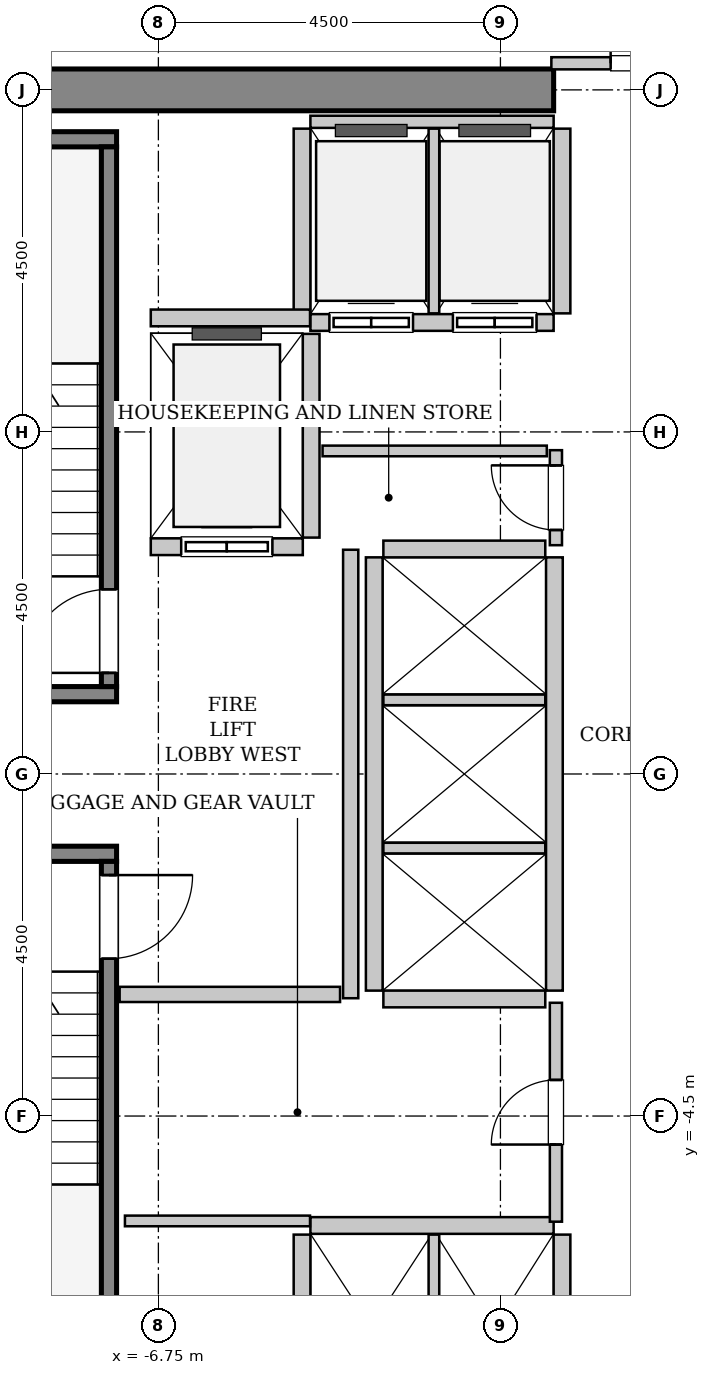
"""IFC4 building model, lengths in metres.
Left out: names, types, materials, properties, quantities, classifications, styles, units other than length and angle.
Written with IfcOpenShell. Run it as: python <this file> out.ifc"""

import sys

from ifc_helpers import new_model, si_unit, direction, frame, frame_2d, origin, place, context, subcontext, project, spatial, rectangle, extrude, source, transform, mapped, element, fill, save


model = new_model("IFC4")
c1 = context("Model", 3, precision=1e-05, world=origin(), true_north=direction((0.0, 1.0)))
c2 = subcontext(c1, "Body", "Model", "MODEL_VIEW")
j1 = project(units=[si_unit("LENGTHUNIT", "METRE"), si_unit("PLANEANGLEUNIT", "RADIAN")], contexts=[c1])
p1 = place(None, origin())
s1 = spatial("IfcSite", under=j1, at=p1, CompositionType="ELEMENT")
p2 = place(p1, origin())
s2 = spatial("IfcBuilding", under=s1, at=p2, CompositionType="ELEMENT")
p3 = place(p2, frame((0.0, 0.0, 113.6)))
s3 = spatial("IfcBuildingStorey", under=s2, at=p3, CompositionType="ELEMENT", Elevation=113.6)
m1 = source(origin(), c2, "Body", "SweptSolid", [
    extrude(rectangle(XDim=9.975, YDim=0.55, at=frame_2d((4.987, 0.0))), origin(), (0.0, 0.0, 1.0), 3.8),
])
p4 = place(p3, frame((-11.525, 9.0, 0.0), z_axis=(0.0, 0.0, 1.0), x_axis=(1.0, 0.0, 0.0)))
e1 = element("IfcWall", 1, at=p4, inside=s3, PredefinedType="SHEAR", context=c2, shape_type="MappedRepresentation", body=[
    mapped(m1, transform((0.0, 0.0, 0.0), x_axis=(1.0, 0.0, 0.0), y_axis=(0.0, 1.0, 0.0), z_axis=(0.0, 0.0, 1.0), scale=1.0)),
])
m2 = source(origin(), c2, "Body", "SweptSolid", [
    extrude(rectangle(XDim=3.4, YDim=0.2, at=frame_2d((1.7, 0.0))), origin(), (0.0, 0.0, 1.0), 3.8),
])
p5 = place(p3, frame((-7.3, 1.05, 0.0), z_axis=(0.0, 0.0, 1.0), x_axis=(-1.0, 0.0, 0.0)))
e2 = element("IfcWall", 2, at=p5, inside=s3, PredefinedType="SOLIDWALL", context=c2, shape_type="MappedRepresentation", body=[
    mapped(m2, transform((0.0, 0.0, 0.0), x_axis=(1.0, 0.0, 0.0), y_axis=(0.0, 1.0, 0.0), z_axis=(0.0, 0.0, 1.0), scale=1.0)),
])
m3 = source(origin(), c2, "Body", "SweptSolid", [
    extrude(rectangle(XDim=3.68, YDim=0.2, at=frame_2d((1.84, 0.0))), origin(), (0.0, 0.0, 1.0), 3.8),
])
p6 = place(p3, frame((-7.3, 8.35, 0.0), z_axis=(0.0, 0.0, 1.0), x_axis=(-1.0, 0.0, 0.0)))
e3 = element("IfcWall", 3, at=p6, inside=s3, PredefinedType="SOLIDWALL", context=c2, shape_type="MappedRepresentation", body=[
    mapped(m3, transform((0.0, 0.0, 0.0), x_axis=(1.0, 0.0, 0.0), y_axis=(0.0, 1.0, 0.0), z_axis=(0.0, 0.0, 1.0), scale=1.0)),
])
m4 = source(origin(), c2, "Body", "SweptSolid", [
    extrude(rectangle(XDim=7.1, YDim=0.2, at=frame_2d((3.55, 0.0))), origin(), (0.0, 0.0, 1.0), 3.8),
])
p7 = place(p3, frame((-7.4, 1.15, 0.0), z_axis=(0.0, 0.0, 1.0), x_axis=(0.0, 1.0, 0.0)))
e4 = element("IfcWall", 4, at=p7, inside=s3, PredefinedType="SOLIDWALL", context=c2, shape_type="MappedRepresentation", body=[
    mapped(m4, transform((0.0, 0.0, 0.0), x_axis=(1.0, 0.0, 0.0), y_axis=(0.0, 1.0, 0.0), z_axis=(0.0, 0.0, 1.0), scale=1.0)),
])
p8 = place(p7, frame((0.18, 0.0, 0.0)))
e5 = element("IfcOpeningElement", 5, at=p8, cuts=e4, PredefinedType="OPENING", context=c2, shape_type="SweptSolid", body=[
    extrude(rectangle(XDim=1.1, YDim=2.15, at=frame_2d((0.55, 1.075))), frame((0.0, 0.11, 0.0), z_axis=(0.0, -1.0, 0.0), x_axis=(1.0, 0.0, 0.0)), (0.0, 0.0, 1.0), 0.22),
])
p9 = place(p3, frame((-10.7, -1.05, 0.0), z_axis=(0.0, 0.0, 1.0), x_axis=(1.0, 0.0, 0.0)))
e6 = element("IfcWall", 6, at=p9, inside=s3, PredefinedType="SOLIDWALL", context=c2, shape_type="MappedRepresentation", body=[
    mapped(m2, transform((0.0, 0.0, 0.0), x_axis=(1.0, 0.0, 0.0), y_axis=(0.0, 1.0, 0.0), z_axis=(0.0, 0.0, 1.0), scale=1.0)),
])
p10 = place(p3, frame((-7.4, -1.15, 0.0), z_axis=(0.0, 0.0, 1.0), x_axis=(0.0, -1.0, 0.0)))
e7 = element("IfcWall", 7, at=p10, inside=s3, PredefinedType="SOLIDWALL", context=c2, shape_type="MappedRepresentation", body=[
    mapped(m4, transform((0.0, 0.0, 0.0), x_axis=(1.0, 0.0, 0.0), y_axis=(0.0, 1.0, 0.0), z_axis=(0.0, 0.0, 1.0), scale=1.0)),
])
p11 = place(p10, frame((0.18, 0.0, 0.0)))
e8 = element("IfcOpeningElement", 8, at=p11, cuts=e7, PredefinedType="OPENING", context=c2, shape_type="SweptSolid", body=[
    extrude(rectangle(XDim=1.1, YDim=2.15, at=frame_2d((0.55, 1.075))), frame((0.0, 0.11, 0.0), z_axis=(0.0, -1.0, 0.0), x_axis=(1.0, 0.0, 0.0)), (0.0, 0.0, 1.0), 0.22),
])
m5 = source(origin(), c2, "Body", "SweptSolid", [
    extrude(rectangle(XDim=2.0, YDim=0.22, at=frame_2d((1.0, 0.0))), origin(), (0.0, 0.0, 1.0), 3.535),
])
p12 = place(p3, frame((-6.85, 2.99, 0.0), z_axis=(0.0, 0.0, 1.0), x_axis=(1.0, 0.0, 0.0)))
e9 = element("IfcWall", 9, at=p12, inside=s3, PredefinedType="SOLIDWALL", context=c2, shape_type="MappedRepresentation", body=[
    mapped(m5, transform((0.0, 0.0, 0.0), x_axis=(1.0, 0.0, 0.0), y_axis=(0.0, 1.0, 0.0), z_axis=(0.0, 0.0, 1.0), scale=1.0)),
])
p13 = place(p12, frame((0.4, 0.0, 0.0)))
e10 = element("IfcOpeningElement", 10, at=p13, cuts=e9, PredefinedType="OPENING", context=c2, shape_type="SweptSolid", body=[
    extrude(rectangle(XDim=1.2, YDim=2.2, at=frame_2d((0.6, 1.1))), frame((0.0, 0.12, 0.0), z_axis=(0.0, -1.0, 0.0), x_axis=(1.0, 0.0, 0.0)), (0.0, 0.0, 1.0), 0.24),
])
m6 = source(origin(), c2, "Body", "SweptSolid", [
    extrude(rectangle(XDim=2.68, YDim=0.22, at=frame_2d((1.34, 0.0))), origin(), (0.0, 0.0, 1.0), 3.535),
])
p14 = place(p3, frame((-4.74, 3.11, 0.0), z_axis=(0.0, 0.0, 1.0), x_axis=(0.0, 1.0, 0.0)))
e11 = element("IfcWall", 11, at=p14, inside=s3, PredefinedType="SOLIDWALL", context=c2, shape_type="MappedRepresentation", body=[
    mapped(m6, transform((0.0, 0.0, 0.0), x_axis=(1.0, 0.0, 0.0), y_axis=(0.0, 1.0, 0.0), z_axis=(0.0, 0.0, 1.0), scale=1.0)),
])
m7 = source(origin(), c2, "Body", "SweptSolid", [
    extrude(rectangle(XDim=3.2, YDim=0.22, at=frame_2d((1.6, 0.0))), origin(), (0.0, 0.0, 1.0), 3.535),
])
p15 = place(p3, frame((-4.75, 5.94, 0.0), z_axis=(0.0, 0.0, 1.0), x_axis=(1.0, 0.0, 0.0)))
e12 = element("IfcWall", 12, at=p15, inside=s3, PredefinedType="SOLIDWALL", context=c2, shape_type="MappedRepresentation", body=[
    mapped(m7, transform((0.0, 0.0, 0.0), x_axis=(1.0, 0.0, 0.0), y_axis=(0.0, 1.0, 0.0), z_axis=(0.0, 0.0, 1.0), scale=1.0)),
])
p16 = place(p15, frame((0.25, 0.0, 0.0)))
e13 = element("IfcOpeningElement", 13, at=p16, cuts=e12, PredefinedType="OPENING", context=c2, shape_type="SweptSolid", body=[
    extrude(rectangle(XDim=1.1, YDim=2.2, at=frame_2d((0.55, 1.1))), frame((0.0, 0.12, 0.0), z_axis=(0.0, -1.0, 0.0), x_axis=(1.0, 0.0, 0.0)), (0.0, 0.0, 1.0), 0.24),
])
p17 = place(p15, frame((1.875, 0.0, 0.0)))
e14 = element("IfcOpeningElement", 14, at=p17, cuts=e12, PredefinedType="OPENING", context=c2, shape_type="SweptSolid", body=[
    extrude(rectangle(XDim=1.1, YDim=2.2, at=frame_2d((0.55, 1.1))), frame((0.0, 0.12, 0.0), z_axis=(0.0, -1.0, 0.0), x_axis=(1.0, 0.0, 0.0)), (0.0, 0.0, 1.0), 0.24),
])
m8 = source(origin(), c2, "Body", "SweptSolid", [
    extrude(rectangle(XDim=3.2, YDim=0.16, at=frame_2d((1.6, 0.0))), origin(), (0.0, 0.0, 1.0), 2.425),
])
p18 = place(p3, frame((-1.55, 8.58, 0.0), z_axis=(0.0, 0.0, 1.0), x_axis=(-1.0, 0.0, 0.0)))
e15 = element("IfcWall", 15, at=p18, inside=s3, PredefinedType="PARTITIONING", context=c2, shape_type="MappedRepresentation", body=[
    mapped(m8, transform((0.0, 0.0, 0.0), x_axis=(1.0, 0.0, 0.0), y_axis=(0.0, 1.0, 0.0), z_axis=(0.0, 0.0, 1.0), scale=1.0)),
])
m9 = source(origin(), c2, "Body", "SweptSolid", [
    extrude(rectangle(XDim=2.43, YDim=0.22, at=frame_2d((1.215, 0.0))), origin(), (0.0, 0.0, 1.0), 3.535),
])
p19 = place(p3, frame((-4.86, 8.49, 0.0), z_axis=(0.0, 0.0, 1.0), x_axis=(0.0, -1.0, 0.0)))
e16 = element("IfcWall", 16, at=p19, inside=s3, PredefinedType="SOLIDWALL", context=c2, shape_type="MappedRepresentation", body=[
    mapped(m9, transform((0.0, 0.0, 0.0), x_axis=(1.0, 0.0, 0.0), y_axis=(0.0, 1.0, 0.0), z_axis=(0.0, 0.0, 1.0), scale=1.0)),
])
m10 = source(origin(), c2, "Body", "SweptSolid", [
    extrude(rectangle(XDim=2.43, YDim=0.14, at=frame_2d((1.215, 0.0))), origin(), (0.0, 0.0, 1.0), 3.535),
])
p20 = place(p3, frame((-3.125, 6.06, 0.0), z_axis=(0.0, 0.0, 1.0), x_axis=(0.0, 1.0, 0.0)))
e17 = element("IfcWall", 17, at=p20, inside=s3, PredefinedType="PARTITIONING", context=c2, shape_type="MappedRepresentation", body=[
    mapped(m10, transform((0.0, 0.0, 0.0), x_axis=(1.0, 0.0, 0.0), y_axis=(0.0, 1.0, 0.0), z_axis=(0.0, 0.0, 1.0), scale=1.0)),
])
p21 = place(p3, frame((-1.44, 6.06, 0.0), z_axis=(0.0, 0.0, 1.0), x_axis=(0.0, 1.0, 0.0)))
e18 = element("IfcWall", 18, at=p21, inside=s3, PredefinedType="SOLIDWALL", context=c2, shape_type="MappedRepresentation", body=[
    mapped(m9, transform((0.0, 0.0, 0.0), x_axis=(1.0, 0.0, 0.0), y_axis=(0.0, 1.0, 0.0), z_axis=(0.0, 0.0, 1.0), scale=1.0)),
])
p22 = place(p3, frame((-1.55, -5.94, 0.0), z_axis=(0.0, 0.0, 1.0), x_axis=(-1.0, 0.0, 0.0)))
e19 = element("IfcWall", 19, at=p22, inside=s3, PredefinedType="SOLIDWALL", context=c2, shape_type="MappedRepresentation", body=[
    mapped(m7, transform((0.0, 0.0, 0.0), x_axis=(1.0, 0.0, 0.0), y_axis=(0.0, 1.0, 0.0), z_axis=(0.0, 0.0, 1.0), scale=1.0)),
])
p23 = place(p3, frame((-4.86, -6.06, 0.0), z_axis=(0.0, 0.0, 1.0), x_axis=(0.0, -1.0, 0.0)))
e20 = element("IfcWall", 20, at=p23, inside=s3, PredefinedType="SOLIDWALL", context=c2, shape_type="MappedRepresentation", body=[
    mapped(m9, transform((0.0, 0.0, 0.0), x_axis=(1.0, 0.0, 0.0), y_axis=(0.0, 1.0, 0.0), z_axis=(0.0, 0.0, 1.0), scale=1.0)),
])
p24 = place(p3, frame((-3.125, -8.49, 0.0), z_axis=(0.0, 0.0, 1.0), x_axis=(0.0, 1.0, 0.0)))
e21 = element("IfcWall", 21, at=p24, inside=s3, PredefinedType="PARTITIONING", context=c2, shape_type="MappedRepresentation", body=[
    mapped(m10, transform((0.0, 0.0, 0.0), x_axis=(1.0, 0.0, 0.0), y_axis=(0.0, 1.0, 0.0), z_axis=(0.0, 0.0, 1.0), scale=1.0)),
])
p25 = place(p3, frame((-1.44, -8.49, 0.0), z_axis=(0.0, 0.0, 1.0), x_axis=(0.0, 1.0, 0.0)))
e22 = element("IfcWall", 22, at=p25, inside=s3, PredefinedType="SOLIDWALL", context=c2, shape_type="MappedRepresentation", body=[
    mapped(m9, transform((0.0, 0.0, 0.0), x_axis=(1.0, 0.0, 0.0), y_axis=(0.0, 1.0, 0.0), z_axis=(0.0, 0.0, 1.0), scale=1.0)),
])
m11 = source(origin(), c2, "Body", "SweptSolid", [
    extrude(rectangle(XDim=5.7, YDim=0.22, at=frame_2d((2.85, 0.0))), origin(), (0.0, 0.0, 1.0), 3.535),
])
for number, where, z_axis, x_axis in (
    (23, (-1.54, -2.85, 0.0), (0.0, 0.0, 1.0), (0.0, 1.0, 0.0)),
    (24, (-3.91, 2.85, 0.0), (0.0, 0.0, 1.0), (0.0, -1.0, 0.0)),
):
    element("IfcWall", number, at=place(p3, frame(where, z_axis=z_axis, x_axis=x_axis)), inside=s3, PredefinedType="SOLIDWALL", context=c2, shape_type="MappedRepresentation", body=[
        mapped(m11, transform((0.0, 0.0, 0.0), x_axis=(1.0, 0.0, 0.0), y_axis=(0.0, 1.0, 0.0), z_axis=(0.0, 0.0, 1.0), scale=1.0)),
    ])
m12 = source(origin(), c2, "Body", "SweptSolid", [
    extrude(rectangle(XDim=2.13, YDim=0.22, at=frame_2d((1.065, 0.0))), origin(), (0.0, 0.0, 1.0), 3.535),
])
p26 = place(p3, frame((-3.79, -2.96, 0.0), z_axis=(0.0, 0.0, 1.0), x_axis=(1.0, 0.0, 0.0)))
e25 = element("IfcWall", 25, at=p26, inside=s3, PredefinedType="SOLIDWALL", context=c2, shape_type="MappedRepresentation", body=[
    mapped(m12, transform((0.0, 0.0, 0.0), x_axis=(1.0, 0.0, 0.0), y_axis=(0.0, 1.0, 0.0), z_axis=(0.0, 0.0, 1.0), scale=1.0)),
])
m13 = source(origin(), c2, "Body", "SweptSolid", [
    extrude(rectangle(XDim=2.13, YDim=0.14, at=frame_2d((1.065, 0.0))), origin(), (0.0, 0.0, 1.0), 3.535),
])
for number, where, z_axis, x_axis in (
    (26, (-3.79, -0.975, 0.0), (0.0, 0.0, 1.0), (1.0, 0.0, 0.0)),
    (27, (-3.79, 0.975, 0.0), (0.0, 0.0, 1.0), (1.0, 0.0, 0.0)),
):
    element("IfcWall", number, at=place(p3, frame(where, z_axis=z_axis, x_axis=x_axis)), inside=s3, PredefinedType="PARTITIONING", context=c2, shape_type="MappedRepresentation", body=[
        mapped(m13, transform((0.0, 0.0, 0.0), x_axis=(1.0, 0.0, 0.0), y_axis=(0.0, 1.0, 0.0), z_axis=(0.0, 0.0, 1.0), scale=1.0)),
    ])
p27 = place(p3, frame((-1.66, 2.96, 0.0), z_axis=(0.0, 0.0, 1.0), x_axis=(-1.0, 0.0, 0.0)))
e28 = element("IfcWall", 28, at=p27, inside=s3, PredefinedType="SOLIDWALL", context=c2, shape_type="MappedRepresentation", body=[
    mapped(m12, transform((0.0, 0.0, 0.0), x_axis=(1.0, 0.0, 0.0), y_axis=(0.0, 1.0, 0.0), z_axis=(0.0, 0.0, 1.0), scale=1.0)),
])
m14 = source(origin(), c2, "Body", "SweptSolid", [
    extrude(rectangle(XDim=2.095, YDim=0.22, at=frame_2d((1.048, 0.0))), origin(), (0.0, 0.0, 1.0), 3.535),
])
p28 = place(p3, frame((-6.85, 6.0, 0.0), z_axis=(0.0, 0.0, 1.0), x_axis=(1.0, 0.0, 0.0)))
e29 = element("IfcWall", 29, at=p28, inside=s3, PredefinedType="SOLIDWALL", context=c2, shape_type="MappedRepresentation", body=[
    mapped(m14, transform((0.0, 0.0, 0.0), x_axis=(1.0, 0.0, 0.0), y_axis=(0.0, 1.0, 0.0), z_axis=(0.0, 0.0, 1.0), scale=1.0)),
])
m15 = source(origin(), c2, "Body", "SweptSolid", [
    extrude(rectangle(XDim=5.9, YDim=0.2, at=frame_2d((2.95, 0.0))), origin(), (0.0, 0.0, 1.0), 3.535),
])
p29 = place(p3, frame((-4.22, -2.95, 0.0), z_axis=(0.0, 0.0, 1.0), x_axis=(0.0, 1.0, 0.0)))
e30 = element("IfcWall", 30, at=p29, inside=s3, PredefinedType="PARTITIONING", context=c2, shape_type="MappedRepresentation", body=[
    mapped(m15, transform((0.0, 0.0, 0.0), x_axis=(1.0, 0.0, 0.0), y_axis=(0.0, 1.0, 0.0), z_axis=(0.0, 0.0, 1.0), scale=1.0)),
])
m16 = source(origin(), c2, "Body", "SweptSolid", [
    extrude(rectangle(XDim=2.9, YDim=0.2, at=frame_2d((1.45, 0.0))), origin(), (0.0, 0.0, 1.0), 3.535),
])
p30 = place(p3, frame((-7.26, -2.9, 0.0), z_axis=(0.0, 0.0, 1.0), x_axis=(1.0, 0.0, 0.0)))
e31 = element("IfcWall", 31, at=p30, inside=s3, PredefinedType="PARTITIONING", context=c2, shape_type="MappedRepresentation", body=[
    mapped(m16, transform((0.0, 0.0, 0.0), x_axis=(1.0, 0.0, 0.0), y_axis=(0.0, 1.0, 0.0), z_axis=(0.0, 0.0, 1.0), scale=1.0)),
])
m17 = source(origin(), c2, "Body", "SweptSolid", [
    extrude(rectangle(XDim=3.16, YDim=0.16, at=frame_2d((1.58, 0.0))), origin(), (0.0, 0.0, 1.0), 2.425),
])
p31 = place(p3, frame((-1.58, 9.35, 0.0), z_axis=(0.0, 0.0, 1.0), x_axis=(1.0, 0.0, 0.0)))
e32 = element("IfcWall", 32, at=p31, inside=s3, PredefinedType="PARTITIONING", context=c2, shape_type="MappedRepresentation", body=[
    mapped(m17, transform((0.0, 0.0, 0.0), x_axis=(1.0, 0.0, 0.0), y_axis=(0.0, 1.0, 0.0), z_axis=(0.0, 0.0, 1.0), scale=1.0)),
])
p32 = place(p31, frame((0.78, 0.0, 0.0)))
e33 = element("IfcOpeningElement", 33, at=p32, cuts=e32, PredefinedType="OPENING", context=c2, shape_type="SweptSolid", body=[
    extrude(rectangle(XDim=1.6, YDim=2.3, at=frame_2d((0.8, 1.15))), frame((0.0, 0.09, 0.0), z_axis=(0.0, -1.0, 0.0), x_axis=(1.0, 0.0, 0.0)), (0.0, 0.0, 1.0), 0.18),
])
m18 = source(origin(), c2, "Body", "SweptSolid", [
    extrude(rectangle(XDim=1.25, YDim=0.16, at=frame_2d((0.625, 0.0))), origin(), (0.0, 0.0, 1.0), 3.535),
])
p33 = place(p3, frame((-1.52, 3.01, 0.0), z_axis=(0.0, 0.0, 1.0), x_axis=(0.0, 1.0, 0.0)))
e34 = element("IfcWall", 34, at=p33, inside=s3, PredefinedType="PARTITIONING", context=c2, shape_type="MappedRepresentation", body=[
    mapped(m18, transform((0.0, 0.0, 0.0), x_axis=(1.0, 0.0, 0.0), y_axis=(0.0, 1.0, 0.0), z_axis=(0.0, 0.0, 1.0), scale=1.0)),
])
p34 = place(p33, frame((0.2, 0.0, 0.0)))
e35 = element("IfcOpeningElement", 35, at=p34, cuts=e34, PredefinedType="OPENING", context=c2, shape_type="SweptSolid", body=[
    extrude(rectangle(XDim=0.85, YDim=2.1, at=frame_2d((0.425, 1.05))), frame((0.0, 0.09, 0.0), z_axis=(0.0, -1.0, 0.0), x_axis=(1.0, 0.0, 0.0)), (0.0, 0.0, 1.0), 0.18),
])
m19 = source(origin(), c2, "Body", "SweptSolid", [
    extrude(rectangle(XDim=2.95, YDim=0.14, at=frame_2d((1.475, 0.0))), origin(), (0.0, 0.0, 1.0), 3.535),
])
p35 = place(p3, frame((-4.59, 4.25, 0.0), z_axis=(0.0, 0.0, 1.0), x_axis=(1.0, 0.0, 0.0)))
e36 = element("IfcWall", 36, at=p35, inside=s3, PredefinedType="PARTITIONING", context=c2, shape_type="MappedRepresentation", body=[
    mapped(m19, transform((0.0, 0.0, 0.0), x_axis=(1.0, 0.0, 0.0), y_axis=(0.0, 1.0, 0.0), z_axis=(0.0, 0.0, 1.0), scale=1.0)),
])
m20 = source(origin(), c2, "Body", "SweptSolid", [
    extrude(rectangle(XDim=2.88, YDim=0.16, at=frame_2d((1.44, 0.0))), origin(), (0.0, 0.0, 1.0), 3.535),
])
p36 = place(p3, frame((-1.52, -5.89, 0.0), z_axis=(0.0, 0.0, 1.0), x_axis=(0.0, 1.0, 0.0)))
e37 = element("IfcWall", 37, at=p36, inside=s3, PredefinedType="PARTITIONING", context=c2, shape_type="MappedRepresentation", body=[
    mapped(m20, transform((0.0, 0.0, 0.0), x_axis=(1.0, 0.0, 0.0), y_axis=(0.0, 1.0, 0.0), z_axis=(0.0, 0.0, 1.0), scale=1.0)),
])
p37 = place(p36, frame((1.015, 0.0, 0.0)))
e38 = element("IfcOpeningElement", 38, at=p37, cuts=e37, PredefinedType="OPENING", context=c2, shape_type="SweptSolid", body=[
    extrude(rectangle(XDim=0.85, YDim=2.1, at=frame_2d((0.425, 1.05))), frame((0.0, 0.09, 0.0), z_axis=(0.0, -1.0, 0.0), x_axis=(1.0, 0.0, 0.0)), (0.0, 0.0, 1.0), 0.18),
])
m21 = source(origin(), c2, "Body", "SweptSolid", [
    extrude(rectangle(XDim=2.435, YDim=0.14, at=frame_2d((1.218, 0.0))), origin(), (0.0, 0.0, 1.0), 3.535),
])
p38 = place(p3, frame((-7.19, -5.88, 0.0), z_axis=(0.0, 0.0, 1.0), x_axis=(1.0, 0.0, 0.0)))
e39 = element("IfcWall", 39, at=p38, inside=s3, PredefinedType="PARTITIONING", context=c2, shape_type="MappedRepresentation", body=[
    mapped(m21, transform((0.0, 0.0, 0.0), x_axis=(1.0, 0.0, 0.0), y_axis=(0.0, 1.0, 0.0), z_axis=(0.0, 0.0, 1.0), scale=1.0)),
])
m22 = source(origin(), c2, "Body", "SweptSolid", [
    extrude(rectangle(XDim=1.1, YDim=2.15, at=frame_2d((0.55, 1.075))), frame((0.0, 0.025, 0.0), z_axis=(0.0, -1.0, 0.0), x_axis=(1.0, 0.0, 0.0)), (0.0, 0.0, 1.0), 0.05),
])
p39 = place(p8, origin())
e40 = element("IfcDoor", 40, at=p39, inside=s3, OperationType="SINGLE_SWING_LEFT", PredefinedType="DOOR", context=c2, shape_type="MappedRepresentation", body=[
    mapped(m22, transform((0.0, 0.0, 0.0), x_axis=(1.0, 0.0, 0.0), y_axis=(0.0, 1.0, 0.0), z_axis=(0.0, 0.0, 1.0), scale=1.0)),
])
fill(e5, e40)
p40 = place(p11, origin())
e41 = element("IfcDoor", 41, at=p40, inside=s3, OperationType="SINGLE_SWING_LEFT", PredefinedType="DOOR", context=c2, shape_type="MappedRepresentation", body=[
    mapped(m22, transform((0.0, 0.0, 0.0), x_axis=(1.0, 0.0, 0.0), y_axis=(0.0, 1.0, 0.0), z_axis=(0.0, 0.0, 1.0), scale=1.0)),
])
fill(e8, e41)
m23 = source(origin(), c2, "Body", "SweptSolid", [
    extrude(rectangle(XDim=1.2, YDim=2.2, at=frame_2d((0.6, 1.1))), frame((0.0, 0.025, 0.0), z_axis=(0.0, -1.0, 0.0), x_axis=(1.0, 0.0, 0.0)), (0.0, 0.0, 1.0), 0.05),
])
p41 = place(p13, origin())
e42 = element("IfcDoor", 42, at=p41, inside=s3, OperationType="SLIDING_TO_LEFT", PredefinedType="DOOR", context=c2, shape_type="MappedRepresentation", body=[
    mapped(m23, transform((0.0, 0.0, 0.0), x_axis=(1.0, 0.0, 0.0), y_axis=(0.0, 1.0, 0.0), z_axis=(0.0, 0.0, 1.0), scale=1.0)),
])
fill(e10, e42)
m24 = source(origin(), c2, "Body", "SweptSolid", [
    extrude(rectangle(XDim=1.1, YDim=2.2, at=frame_2d((0.55, 1.1))), frame((0.0, 0.025, 0.0), z_axis=(0.0, -1.0, 0.0), x_axis=(1.0, 0.0, 0.0)), (0.0, 0.0, 1.0), 0.05),
])
p42 = place(p16, origin())
e43 = element("IfcDoor", 43, at=p42, inside=s3, OperationType="DOUBLE_DOOR_SLIDING", PredefinedType="DOOR", context=c2, shape_type="MappedRepresentation", body=[
    mapped(m24, transform((0.0, 0.0, 0.0), x_axis=(1.0, 0.0, 0.0), y_axis=(0.0, 1.0, 0.0), z_axis=(0.0, 0.0, 1.0), scale=1.0)),
])
fill(e13, e43)
p43 = place(p17, origin())
e44 = element("IfcDoor", 44, at=p43, inside=s3, OperationType="DOUBLE_DOOR_SLIDING", PredefinedType="DOOR", context=c2, shape_type="MappedRepresentation", body=[
    mapped(m24, transform((0.0, 0.0, 0.0), x_axis=(1.0, 0.0, 0.0), y_axis=(0.0, 1.0, 0.0), z_axis=(0.0, 0.0, 1.0), scale=1.0)),
])
fill(e14, e44)
m25 = source(origin(), c2, "Body", "SweptSolid", [
    extrude(rectangle(XDim=1.6, YDim=2.3, at=frame_2d((0.8, 1.15))), frame((0.0, 0.025, 0.0), z_axis=(0.0, -1.0, 0.0), x_axis=(1.0, 0.0, 0.0)), (0.0, 0.0, 1.0), 0.05),
])
p44 = place(p32, origin())
e45 = element("IfcDoor", 45, at=p44, inside=s3, OperationType="DOUBLE_DOOR_SINGLE_SWING", PredefinedType="DOOR", context=c2, shape_type="MappedRepresentation", body=[
    mapped(m25, transform((0.0, 0.0, 0.0), x_axis=(1.0, 0.0, 0.0), y_axis=(0.0, 1.0, 0.0), z_axis=(0.0, 0.0, 1.0), scale=1.0)),
])
fill(e33, e45)
m26 = source(origin(), c2, "Body", "SweptSolid", [
    extrude(rectangle(XDim=0.85, YDim=2.1, at=frame_2d((0.425, 1.05))), frame((0.0, 0.025, 0.0), z_axis=(0.0, -1.0, 0.0), x_axis=(1.0, 0.0, 0.0)), (0.0, 0.0, 1.0), 0.05),
])
p45 = place(p34, origin())
e46 = element("IfcDoor", 46, at=p45, inside=s3, OperationType="SINGLE_SWING_RIGHT", PredefinedType="DOOR", context=c2, shape_type="MappedRepresentation", body=[
    mapped(m26, transform((0.0, 0.0, 0.0), x_axis=(1.0, 0.0, 0.0), y_axis=(0.0, 1.0, 0.0), z_axis=(0.0, 0.0, 1.0), scale=1.0)),
])
fill(e35, e46)
p46 = place(p37, origin())
e47 = element("IfcDoor", 47, at=p46, inside=s3, OperationType="SINGLE_SWING_LEFT", PredefinedType="DOOR", context=c2, shape_type="MappedRepresentation", body=[
    mapped(m26, transform((0.0, 0.0, 0.0), x_axis=(1.0, 0.0, 0.0), y_axis=(0.0, 1.0, 0.0), z_axis=(0.0, 0.0, 1.0), scale=1.0)),
])
fill(e38, e47)
save(model, sys.argv[1])
